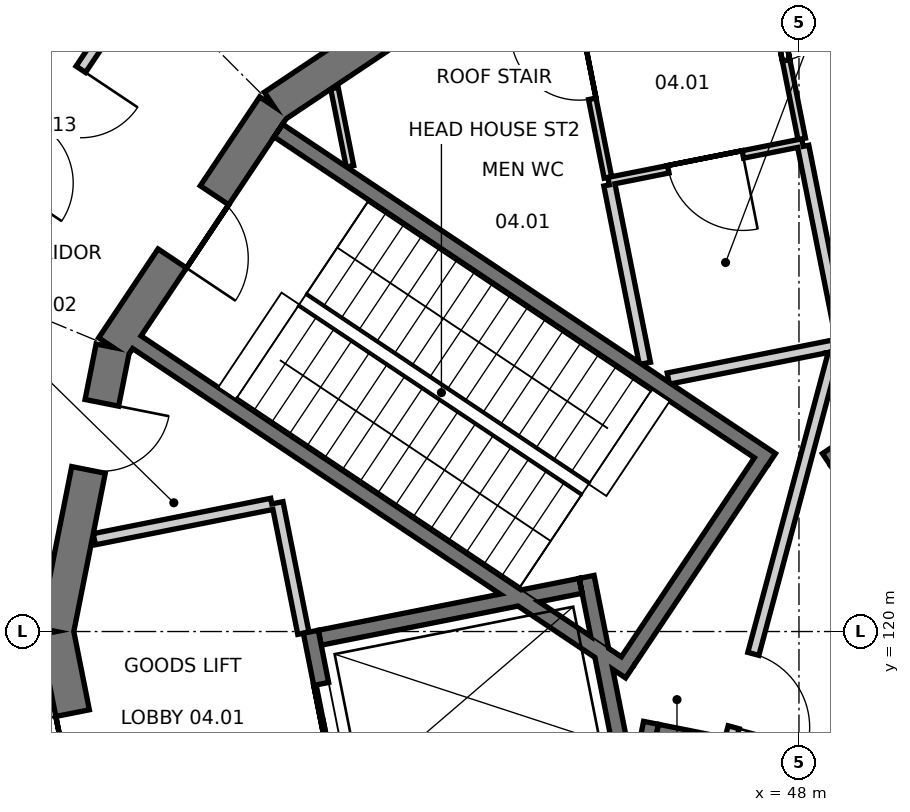
"""IFC4 building model, lengths in metres.
Left out: names, types, materials, properties, quantities, classifications, styles, units other than length and angle.
Written with IfcOpenShell. Run it as: python <this file> out.ifc"""

import sys

from ifc_helpers import new_model, si_unit, direction, frame, frame_2d, origin, place, context, subcontext, project, spatial, polyline, rectangle, outline, extrude, element, fill, save


model = new_model("IFC4")
c1 = context("Model", 3, precision=1e-05, world=origin(), true_north=direction((0.0, 1.0)))
c2 = subcontext(c1, "Body", "Model", "MODEL_VIEW")
j1 = project(units=[si_unit("LENGTHUNIT", "METRE"), si_unit("PLANEANGLEUNIT", "RADIAN")], contexts=[c1])
p1 = place(None, origin())
s1 = spatial("IfcSite", under=j1, at=p1, CompositionType="ELEMENT")
p2 = place(p1, origin())
s2 = spatial("IfcBuilding", under=s1, at=p2, CompositionType="ELEMENT")
p3 = place(p2, frame((0.0, 0.0, 20.4)))
s3 = spatial("IfcBuildingStorey", under=s2, at=p3, CompositionType="ELEMENT", Elevation=20.4)
p4 = place(p3, frame((44.261, 129.027, 0.0), z_axis=(0.0, 0.0, 1.0), x_axis=(-0.83148829117, -0.555542277102, 0.0)))
e1 = element("IfcWall", 1, at=p4, inside=s3, PredefinedType="SHEAR", context=c2, shape_type="SweptSolid", body=[
    extrude(outline(polyline([(-0.045, -0.225), (3.857, -0.225), (3.768, 0.225), (0.045, 0.225), (-0.045, -0.225)])), origin(), (0.0, 0.0, 1.0), 4.52),
])
p5 = place(p3, frame((41.091, 126.909, 0.0), z_axis=(0.0, 0.0, 1.0), x_axis=(-0.555542277102, -0.83148829117, 0.0)))
e2 = element("IfcWall", 2, at=p5, inside=s3, PredefinedType="SHEAR", context=c2, shape_type="SweptSolid", body=[
    extrude(outline(polyline([(-0.045, -0.225), (3.857, -0.225), (3.768, 0.225), (0.045, 0.225), (-0.045, -0.225)])), origin(), (0.0, 0.0, 1.0), 4.52),
])
p6 = place(p5, frame((1.406, 0.0, 0.0)))
e3 = element("IfcOpeningElement", 3, at=p6, cuts=e2, PredefinedType="OPENING", context=c2, shape_type="SweptSolid", body=[
    extrude(rectangle(XDim=1.0, YDim=2.1, at=frame_2d((0.5, 1.05))), frame((0.0, 0.235, 0.0), z_axis=(0.0, -1.0, 0.0), x_axis=(1.0, 0.0, 0.0)), (0.0, 0.0, 1.0), 0.47),
])
p7 = place(p3, frame((38.973, 123.739, 0.0), z_axis=(0.0, 0.0, 1.0), x_axis=(-0.195069197673, -0.98078948206, 0.0)))
e4 = element("IfcWall", 4, at=p7, inside=s3, PredefinedType="SHEAR", context=c2, shape_type="SweptSolid", body=[
    extrude(outline(polyline([(-0.045, -0.225), (3.857, -0.225), (3.768, 0.225), (0.045, 0.225), (-0.045, -0.225)])), origin(), (0.0, 0.0, 1.0), 4.52),
])
p8 = place(p7, frame((0.745, 0.0, 0.0)))
e5 = element("IfcOpeningElement", 5, at=p8, cuts=e4, PredefinedType="OPENING", context=c2, shape_type="SweptSolid", body=[
    extrude(rectangle(XDim=0.9, YDim=2.1, at=frame_2d((0.45, 1.05))), frame((0.0, 0.235, 0.0), z_axis=(0.0, -1.0, 0.0), x_axis=(1.0, 0.0, 0.0)), (0.0, 0.0, 1.0), 0.47),
])
p9 = place(p3, frame((38.229, 120.0, 0.0), z_axis=(0.0, 0.0, 1.0), x_axis=(0.195069197673, -0.98078948206, 0.0)))
e6 = element("IfcWall", 6, at=p9, inside=s3, PredefinedType="SHEAR", context=c2, shape_type="SweptSolid", body=[
    extrude(outline(polyline([(-0.045, -0.225), (3.857, -0.225), (3.768, 0.225), (0.045, 0.225), (-0.045, -0.225)])), origin(), (0.0, 0.0, 1.0), 4.52),
])
p10 = place(p9, frame((1.095, 0.0, 0.0)))
e7 = element("IfcOpeningElement", 7, at=p10, cuts=e6, PredefinedType="OPENING", context=c2, shape_type="SweptSolid", body=[
    extrude(rectangle(XDim=1.6, YDim=2.1, at=frame_2d((0.8, 1.05))), frame((0.0, 0.235, 0.0), z_axis=(0.0, -1.0, 0.0), x_axis=(1.0, 0.0, 0.0)), (0.0, 0.0, 1.0), 0.47),
])
p11 = place(p3, frame((48.365, 122.258, 0.0), z_axis=(0.0, 0.0, 1.0), x_axis=(0.831476803301, 0.555559470779, 0.0)))
e8 = element("IfcWall", 8, at=p11, inside=s3, PredefinedType="SHEAR", context=c2, shape_type="SweptSolid", body=[
    extrude(rectangle(XDim=7.8, YDim=0.2, at=frame_2d((3.9, 0.0))), origin(), (0.0, 0.0, 1.0), 4.52),
])
p12 = place(p3, frame((45.774, 119.473, 0.0), z_axis=(0.0, 0.0, 1.0), x_axis=(-0.831486463828, 0.555545012102, 0.0)))
e9 = element("IfcWall", 9, at=p12, inside=s3, PredefinedType="SHEAR", context=c2, shape_type="SweptSolid", body=[
    extrude(rectangle(XDim=7.8, YDim=0.2, at=frame_2d((3.9, 0.0))), origin(), (0.0, 0.0, 1.0), 4.52),
])
p13 = place(p3, frame((47.635, 122.258, 0.0), z_axis=(0.0, 0.0, 1.0), x_axis=(-0.831476803301, 0.555559470779, 0.0)))
e10 = element("IfcWall", 10, at=p13, inside=s3, PredefinedType="SHEAR", context=c2, shape_type="SweptSolid", body=[
    extrude(rectangle(XDim=7.8, YDim=0.2, at=frame_2d((3.9, 0.0))), origin(), (0.0, 0.0, 1.0), 4.52),
])
p14 = place(p3, frame((47.497, 122.231, 0.0), z_axis=(0.0, 0.0, 1.0), x_axis=(-0.55555842186, -0.831477504146, 0.0)))
e11 = element("IfcWall", 11, at=p14, inside=s3, PredefinedType="SHEAR", context=c2, shape_type="SweptSolid", body=[
    extrude(rectangle(XDim=3.15, YDim=0.2, at=frame_2d((1.575, 0.0))), origin(), (0.0, 0.0, 1.0), 4.52),
])
p15 = place(p3, frame((46.053, 118.799, 0.0), z_axis=(0.0, 0.0, 1.0), x_axis=(-0.195092759861, -0.980784795483, 0.0)))
e12 = element("IfcWall", 12, at=p15, inside=s3, PredefinedType="SHEAR", context=c2, shape_type="SweptSolid", body=[
    extrude(rectangle(XDim=7.8, YDim=0.2, at=frame_2d((3.9, 0.0))), origin(), (0.0, 0.0, 1.0), 4.52),
])
p16 = place(p3, frame((46.132, 118.681, 0.0), z_axis=(0.0, 0.0, 1.0), x_axis=(0.980785830564, -0.195087556151, 0.0)))
e13 = element("IfcWall", 13, at=p16, inside=s3, PredefinedType="SHEAR", context=c2, shape_type="SweptSolid", body=[
    extrude(rectangle(XDim=3.15, YDim=0.2, at=frame_2d((1.575, 0.0))), origin(), (0.0, 0.0, 1.0), 4.52),
])
p17 = place(p3, frame((41.577, 119.997, 0.0), z_axis=(0.0, 0.0, 1.0), x_axis=(0.195120673769, -0.980779242576, 0.0)))
e14 = element("IfcWall", 14, at=p17, inside=s3, PredefinedType="SHEAR", context=c2, shape_type="SweptSolid", body=[
    extrude(rectangle(XDim=2.5, YDim=0.2, at=frame_2d((1.25, 0.0))), origin(), (0.0, 0.0, 1.0), 9.02),
])
p18 = place(p17, frame((0.7, 0.0, 0.0)))
e15 = element("IfcOpeningElement", 15, at=p18, cuts=e14, PredefinedType="OPENING", context=c2, shape_type="SweptSolid", body=[
    extrude(rectangle(XDim=1.1, YDim=2.1, at=frame_2d((0.55, 1.05))), frame((0.0, 0.11, 0.0), z_axis=(0.0, -1.0, 0.0), x_axis=(1.0, 0.0, 0.0)), (0.0, 0.0, 1.0), 0.22),
])
p19 = place(p3, frame((45.206, 120.719, 0.0), z_axis=(0.0, 0.0, 1.0), x_axis=(0.195158270522, -0.980771762158, 0.0)))
e16 = element("IfcWall", 16, at=p19, inside=s3, PredefinedType="SHEAR", context=c2, shape_type="SweptSolid", body=[
    extrude(rectangle(XDim=2.647, YDim=0.2, at=frame_2d((1.323, 0.0))), origin(), (0.0, 0.0, 1.0), 9.02),
])
p20 = place(p3, frame((45.127, 120.601, 0.0), z_axis=(0.0, 0.0, 1.0), x_axis=(-0.980794727808, -0.195042820694, 0.0)))
e17 = element("IfcWall", 17, at=p20, inside=s3, PredefinedType="SHEAR", context=c2, shape_type="SweptSolid", body=[
    extrude(rectangle(XDim=3.5, YDim=0.2, at=frame_2d((1.75, 0.0))), origin(), (0.0, 0.0, 1.0), 9.02),
])
p21 = place(p3, frame((48.365, 122.258, 4.8), z_axis=(0.0, 0.0, 1.0), x_axis=(0.831476803301, 0.555559470779, 0.0)))
e18 = element("IfcWall", 18, at=p21, inside=s3, PredefinedType="SOLIDWALL", context=c2, shape_type="SweptSolid", body=[
    extrude(rectangle(XDim=7.8, YDim=0.2, at=frame_2d((3.9, 0.0))), origin(), (0.0, 0.0, 1.0), 2.4),
])
p22 = place(p3, frame((45.774, 119.473, 4.8), z_axis=(0.0, 0.0, 1.0), x_axis=(-0.831486463828, 0.555545012102, 0.0)))
e19 = element("IfcWall", 19, at=p22, inside=s3, PredefinedType="SOLIDWALL", context=c2, shape_type="SweptSolid", body=[
    extrude(rectangle(XDim=7.8, YDim=0.2, at=frame_2d((3.9, 0.0))), origin(), (0.0, 0.0, 1.0), 2.4),
])
p23 = place(p3, frame((47.635, 122.258, 4.8), z_axis=(0.0, 0.0, 1.0), x_axis=(-0.831476803301, 0.555559470779, 0.0)))
e20 = element("IfcWall", 20, at=p23, inside=s3, PredefinedType="SOLIDWALL", context=c2, shape_type="SweptSolid", body=[
    extrude(rectangle(XDim=7.8, YDim=0.2, at=frame_2d((3.9, 0.0))), origin(), (0.0, 0.0, 1.0), 2.4),
])
p24 = place(p3, frame((47.497, 122.231, 4.8), z_axis=(0.0, 0.0, 1.0), x_axis=(-0.55555842186, -0.831477504146, 0.0)))
e21 = element("IfcWall", 21, at=p24, inside=s3, PredefinedType="SOLIDWALL", context=c2, shape_type="SweptSolid", body=[
    extrude(rectangle(XDim=3.15, YDim=0.2, at=frame_2d((1.575, 0.0))), origin(), (0.0, 0.0, 1.0), 2.4),
])
p25 = place(p3, frame((41.122, 126.73, 4.8), z_axis=(0.0, 0.0, 1.0), x_axis=(-0.555572709421, -0.831467957619, 0.0)))
e22 = element("IfcWall", 22, at=p25, inside=s3, PredefinedType="SOLIDWALL", context=c2, shape_type="SweptSolid", body=[
    extrude(rectangle(XDim=3.55, YDim=0.2, at=frame_2d((1.775, 0.0))), origin(), (0.0, 0.0, 1.0), 2.4),
])
p26 = place(p25, frame((1.275, 0.0, 0.16)))
e23 = element("IfcOpeningElement", 23, at=p26, cuts=e22, PredefinedType="OPENING", context=c2, shape_type="SweptSolid", body=[
    extrude(rectangle(XDim=1.0, YDim=2.1, at=frame_2d((0.5, 1.05))), frame((0.0, 0.11, 0.0), z_axis=(0.0, -1.0, 0.0), x_axis=(1.0, 0.0, 0.0)), (0.0, 0.0, 1.0), 0.22),
])
p27 = place(p3, frame((42.258, 125.731, 4.96), z_axis=(0.0, 0.0, 1.0), x_axis=(-0.555488691107, -0.831524091083, 0.0)))
e24 = element("IfcWall", 24, at=p27, inside=s3, PredefinedType="SOLIDWALL", context=c2, shape_type="SweptSolid", body=[
    extrude(rectangle(XDim=1.5, YDim=0.2, at=frame_2d((0.75, 0.0))), origin(), (0.0, 0.0, 1.0), 1.1),
])
p28 = place(p3, frame((41.479, 119.977, 0.0), z_axis=(0.0, 0.0, 1.0), x_axis=(-0.19501613536, 0.98080003413, 0.0)))
e25 = element("IfcWall", 25, at=p28, inside=s3, PredefinedType="PARTITIONING", context=c2, shape_type="SweptSolid", body=[
    extrude(rectangle(XDim=1.75, YDim=0.15, at=frame_2d((0.875, 0.0))), origin(), (0.0, 0.0, 1.0), 4.52),
])
p29 = place(p3, frame((41.064, 121.679, 0.0), z_axis=(0.0, 0.0, 1.0), x_axis=(-0.980781272394, -0.195110470559, 0.0)))
e26 = element("IfcWall", 26, at=p29, inside=s3, PredefinedType="PARTITIONING", context=c2, shape_type="SweptSolid", body=[
    extrude(rectangle(XDim=2.381, YDim=0.15, at=frame_2d((1.19, 0.0))), origin(), (0.0, 0.0, 1.0), 4.52),
])
p30 = place(p3, frame((48.046, 126.433, 0.0), z_axis=(0.0, 0.0, 1.0), x_axis=(-0.980778805994, -0.195122868248, 0.0)))
e27 = element("IfcWall", 27, at=p30, inside=s3, PredefinedType="PARTITIONING", context=c2, shape_type="SweptSolid", body=[
    extrude(rectangle(XDim=2.6, YDim=0.1, at=frame_2d((1.3, 0.0))), origin(), (0.0, 0.0, 1.0), 4.52),
])
p31 = place(p30, frame((0.8, 0.0, 0.0)))
e28 = element("IfcOpeningElement", 28, at=p31, cuts=e27, PredefinedType="OPENING", context=c2, shape_type="SweptSolid", body=[
    extrude(rectangle(XDim=1.0, YDim=2.1, at=frame_2d((0.5, 1.05))), frame((0.0, 0.06, 0.0), z_axis=(0.0, -1.0, 0.0), x_axis=(1.0, 0.0, 0.0)), (0.0, 0.0, 1.0), 0.12),
])
p32 = place(p3, frame((45.486, 125.974, 0.0), z_axis=(0.0, 0.0, 1.0), x_axis=(-0.195054549846, 0.980792395252, 0.0)))
e29 = element("IfcWall", 29, at=p32, inside=s3, PredefinedType="PARTITIONING", context=c2, shape_type="SweptSolid", body=[
    extrude(rectangle(XDim=3.008, YDim=0.1, at=frame_2d((1.504, 0.0))), origin(), (0.0, 0.0, 1.0), 4.52),
])
p33 = place(p32, frame((1.054, 0.0, 0.0)))
e30 = element("IfcOpeningElement", 30, at=p33, cuts=e29, PredefinedType="OPENING", context=c2, shape_type="SweptSolid", body=[
    extrude(rectangle(XDim=0.9, YDim=2.1, at=frame_2d((0.45, 1.05))), frame((0.0, 0.06, 0.0), z_axis=(0.0, -1.0, 0.0), x_axis=(1.0, 0.0, 0.0)), (0.0, 0.0, 1.0), 0.12),
])
p34 = place(p3, frame((47.449, 129.432, 0.0), z_axis=(0.0, 0.0, 1.0), x_axis=(0.195054549846, -0.980792395252, 0.0)))
e31 = element("IfcWall", 31, at=p34, inside=s3, PredefinedType="PARTITIONING", context=c2, shape_type="SweptSolid", body=[
    extrude(rectangle(XDim=3.008, YDim=0.1, at=frame_2d((1.504, 0.0))), origin(), (0.0, 0.0, 1.0), 4.52),
])
p35 = place(p34, frame((1.054, 0.0, 0.0)))
e32 = element("IfcOpeningElement", 32, at=p35, cuts=e31, PredefinedType="OPENING", context=c2, shape_type="SweptSolid", body=[
    extrude(rectangle(XDim=0.9, YDim=2.1, at=frame_2d((0.45, 1.05))), frame((0.0, 0.06, 0.0), z_axis=(0.0, -1.0, 0.0), x_axis=(1.0, 0.0, 0.0)), (0.0, 0.0, 1.0), 0.12),
])
p36 = place(p3, frame((48.056, 126.384, 0.0), z_axis=(0.0, 0.0, 1.0), x_axis=(0.195123903338, -0.980778600065, 0.0)))
e33 = element("IfcWall", 33, at=p36, inside=s3, PredefinedType="PARTITIONING", context=c2, shape_type="SweptSolid", body=[
    extrude(rectangle(XDim=2.65, YDim=0.15, at=frame_2d((1.325, 0.0))), origin(), (0.0, 0.0, 1.0), 4.52),
])
p37 = place(p3, frame((48.524, 123.775, 0.0), z_axis=(0.0, 0.0, 1.0), x_axis=(-0.980777249161, -0.195130693455, 0.0)))
e34 = element("IfcWall", 34, at=p37, inside=s3, PredefinedType="PARTITIONING", context=c2, shape_type="SweptSolid", body=[
    extrude(rectangle(XDim=2.287, YDim=0.15, at=frame_2d((1.144, 0.0))), origin(), (0.0, 0.0, 1.0), 4.52),
])
p38 = place(p3, frame((45.973, 123.528, 0.0), z_axis=(0.0, 0.0, 1.0), x_axis=(-0.195135731435, 0.980776246815, 0.0)))
e35 = element("IfcWall", 35, at=p38, inside=s3, PredefinedType="PARTITIONING", context=c2, shape_type="SweptSolid", body=[
    extrude(rectangle(XDim=2.395, YDim=0.15, at=frame_2d((1.197, 0.0))), origin(), (0.0, 0.0, 1.0), 4.52),
])
p39 = place(p3, frame((42.093, 126.12, 0.0), z_axis=(0.0, 0.0, 1.0), x_axis=(-0.195175461866, 0.980768341192, 0.0)))
e36 = element("IfcWall", 36, at=p39, inside=s3, PredefinedType="PARTITIONING", context=c2, shape_type="SweptSolid", body=[
    extrude(rectangle(XDim=1.048, YDim=0.1, at=frame_2d((0.524, 0.0))), origin(), (0.0, 0.0, 1.0), 4.52),
])
p40 = place(p3, frame((47.102, 118.595, 0.0), z_axis=(0.0, 0.0, 1.0), x_axis=(0.258814124304, 0.9659271448, 0.0)))
e37 = element("IfcWall", 37, at=p40, inside=s3, PredefinedType="PARTITIONING", context=c2, shape_type="SweptSolid", body=[
    extrude(rectangle(XDim=5.265, YDim=0.15, at=frame_2d((2.632, 0.0))), origin(), (0.0, 0.0, 1.0), 4.52),
])
p41 = place(p40, frame((0.15, 0.0, 0.0)))
e38 = element("IfcOpeningElement", 38, at=p41, cuts=e37, PredefinedType="OPENING", context=c2, shape_type="SweptSolid", body=[
    extrude(rectangle(XDim=1.0, YDim=2.1, at=frame_2d((0.5, 1.05))), frame((0.0, 0.085, 0.0), z_axis=(0.0, -1.0, 0.0), x_axis=(1.0, 0.0, 0.0)), (0.0, 0.0, 1.0), 0.17),
])
p42 = place(p3, frame((36.729, 124.669, 0.0), z_axis=(0.0, 0.0, 1.0), x_axis=(0.555552075851, 0.831481744248, 0.0)))
e39 = element("IfcWall", 39, at=p42, inside=s3, PredefinedType="PARTITIONING", context=c2, shape_type="SweptSolid", body=[
    extrude(rectangle(XDim=4.76, YDim=0.15, at=frame_2d((2.38, 0.0))), origin(), (0.0, 0.0, 1.0), 4.52),
])
p43 = place(p42, frame((1.48, 0.0, 0.0)))
e40 = element("IfcOpeningElement", 40, at=p43, cuts=e39, PredefinedType="OPENING", context=c2, shape_type="SweptSolid", body=[
    extrude(rectangle(XDim=1.8, YDim=2.1, at=frame_2d((0.9, 1.05))), frame((0.0, 0.085, 0.0), z_axis=(0.0, -1.0, 0.0), x_axis=(1.0, 0.0, 0.0)), (0.0, 0.0, 1.0), 0.17),
])
p44 = place(p26, origin())
e41 = element("IfcDoor", 41, at=p44, inside=s3, OperationType="SINGLE_SWING_LEFT", PredefinedType="DOOR", context=c2, shape_type="SweptSolid", body=[
    extrude(rectangle(XDim=1.0, YDim=2.1, at=frame_2d((0.5, 1.05))), frame((0.0, 0.025, 0.0), z_axis=(0.0, -1.0, 0.0), x_axis=(1.0, 0.0, 0.0)), (0.0, 0.0, 1.0), 0.05),
])
fill(e23, e41)
p45 = place(p6, origin())
e42 = element("IfcDoor", 42, at=p45, inside=s3, OperationType="SINGLE_SWING_RIGHT", PredefinedType="DOOR", context=c2, shape_type="SweptSolid", body=[
    extrude(rectangle(XDim=1.0, YDim=2.1, at=frame_2d((0.5, 1.05))), frame((0.0, 0.025, 0.0), z_axis=(0.0, -1.0, 0.0), x_axis=(1.0, 0.0, 0.0)), (0.0, 0.0, 1.0), 0.05),
])
fill(e3, e42)
p46 = place(p18, origin())
e43 = element("IfcDoor", 43, at=p46, inside=s3, OperationType="SLIDING_TO_LEFT", PredefinedType="DOOR", context=c2, shape_type="SweptSolid", body=[
    extrude(rectangle(XDim=1.1, YDim=2.1, at=frame_2d((0.55, 1.05))), frame((0.0, 0.025, 0.0), z_axis=(0.0, -1.0, 0.0), x_axis=(1.0, 0.0, 0.0)), (0.0, 0.0, 1.0), 0.05),
])
fill(e15, e43)
p47 = place(p10, frame((1.6, 0.0, 0.0), z_axis=(0.0, 0.0, 1.0), x_axis=(-1.0, 0.0, 0.0)))
e44 = element("IfcDoor", 44, at=p47, inside=s3, OperationType="DOUBLE_DOOR_SINGLE_SWING", PredefinedType="DOOR", context=c2, shape_type="SweptSolid", body=[
    extrude(rectangle(XDim=1.6, YDim=2.1, at=frame_2d((0.8, 1.05))), frame((0.0, 0.025, 0.0), z_axis=(0.0, -1.0, 0.0), x_axis=(1.0, 0.0, 0.0)), (0.0, 0.0, 1.0), 0.05),
])
fill(e7, e44)
p48 = place(p8, origin())
e45 = element("IfcDoor", 45, at=p48, inside=s3, OperationType="SINGLE_SWING_LEFT", PredefinedType="DOOR", context=c2, shape_type="SweptSolid", body=[
    extrude(rectangle(XDim=0.9, YDim=2.1, at=frame_2d((0.45, 1.05))), frame((0.0, 0.025, 0.0), z_axis=(0.0, -1.0, 0.0), x_axis=(1.0, 0.0, 0.0)), (0.0, 0.0, 1.0), 0.05),
])
fill(e5, e45)
p49 = place(p31, origin())
e46 = element("IfcDoor", 46, at=p49, inside=s3, OperationType="SINGLE_SWING_LEFT", PredefinedType="DOOR", context=c2, shape_type="SweptSolid", body=[
    extrude(rectangle(XDim=1.0, YDim=2.1, at=frame_2d((0.5, 1.05))), frame((0.0, 0.025, 0.0), z_axis=(0.0, -1.0, 0.0), x_axis=(1.0, 0.0, 0.0)), (0.0, 0.0, 1.0), 0.05),
])
fill(e28, e46)
p50 = place(p33, origin())
e47 = element("IfcDoor", 47, at=p50, inside=s3, OperationType="SINGLE_SWING_RIGHT", PredefinedType="DOOR", context=c2, shape_type="SweptSolid", body=[
    extrude(rectangle(XDim=0.9, YDim=2.1, at=frame_2d((0.45, 1.05))), frame((0.0, 0.025, 0.0), z_axis=(0.0, -1.0, 0.0), x_axis=(1.0, 0.0, 0.0)), (0.0, 0.0, 1.0), 0.05),
])
fill(e30, e47)
p51 = place(p35, origin())
e48 = element("IfcDoor", 48, at=p51, inside=s3, OperationType="SINGLE_SWING_LEFT", PredefinedType="DOOR", context=c2, shape_type="SweptSolid", body=[
    extrude(rectangle(XDim=0.9, YDim=2.1, at=frame_2d((0.45, 1.05))), frame((0.0, 0.025, 0.0), z_axis=(0.0, -1.0, 0.0), x_axis=(1.0, 0.0, 0.0)), (0.0, 0.0, 1.0), 0.05),
])
fill(e32, e48)
p52 = place(p41, frame((1.0, 0.0, 0.0), z_axis=(0.0, 0.0, 1.0), x_axis=(-1.0, 0.0, 0.0)))
e49 = element("IfcDoor", 49, at=p52, inside=s3, OperationType="SINGLE_SWING_RIGHT", PredefinedType="DOOR", context=c2, shape_type="SweptSolid", body=[
    extrude(rectangle(XDim=1.0, YDim=2.1, at=frame_2d((0.5, 1.05))), frame((0.0, 0.025, 0.0), z_axis=(0.0, -1.0, 0.0), x_axis=(1.0, 0.0, 0.0)), (0.0, 0.0, 1.0), 0.05),
])
fill(e38, e49)
p53 = place(p43, frame((1.8, 0.0, 0.0), z_axis=(0.0, 0.0, 1.0), x_axis=(-1.0, 0.0, 0.0)))
e50 = element("IfcDoor", 50, at=p53, inside=s3, OperationType="DOUBLE_DOOR_SINGLE_SWING", PredefinedType="DOOR", context=c2, shape_type="SweptSolid", body=[
    extrude(rectangle(XDim=1.8, YDim=2.1, at=frame_2d((0.9, 1.05))), frame((0.0, 0.025, 0.0), z_axis=(0.0, -1.0, 0.0), x_axis=(1.0, 0.0, 0.0)), (0.0, 0.0, 1.0), 0.05),
])
fill(e40, e50)
save(model, sys.argv[1])
